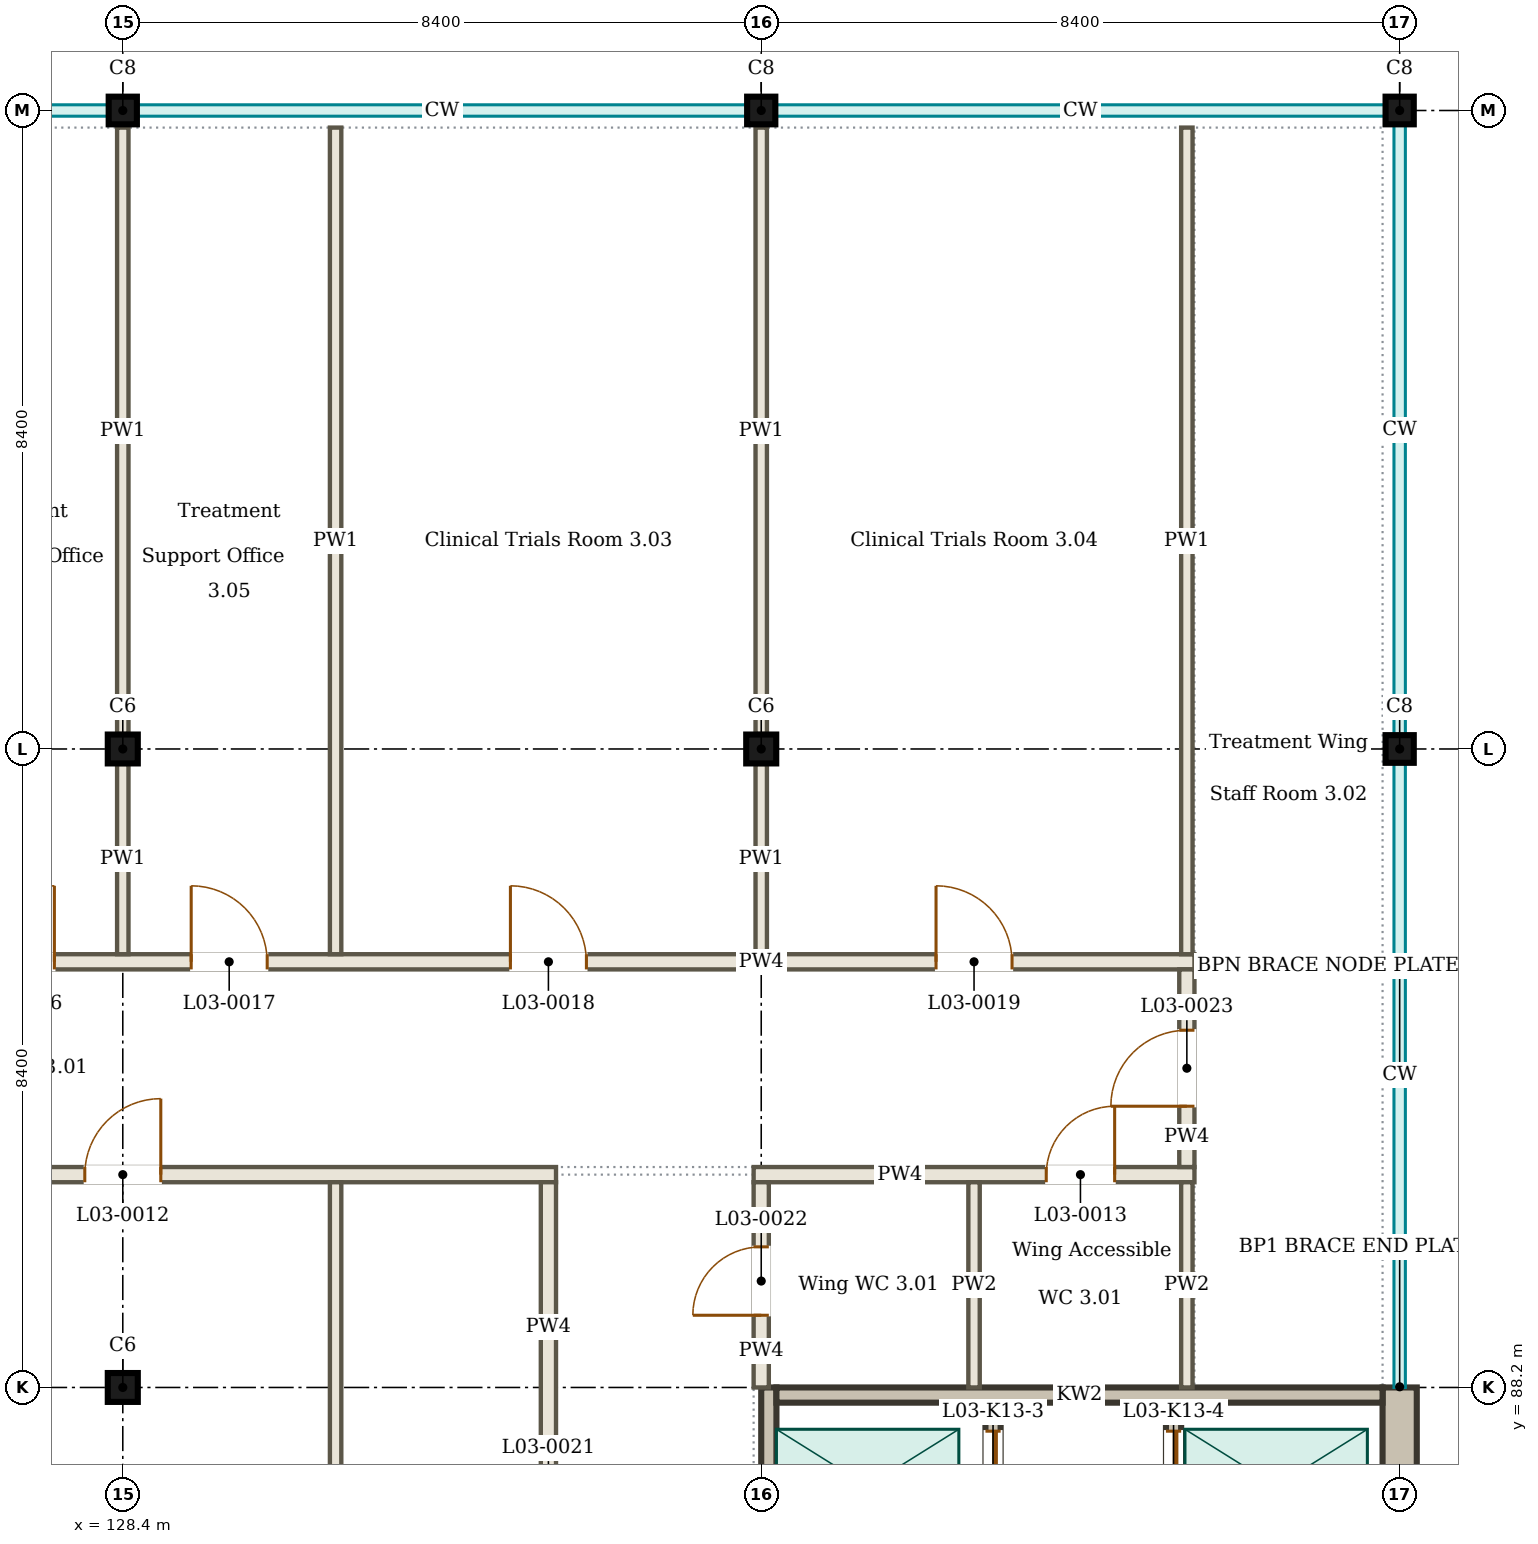
"""IFC4 building model, lengths in metres.
Left out: names, types, materials, properties, quantities, classifications, styles, units other than length and angle.
Written with IfcOpenShell. Run it as: python <this file> out.ifc"""

import sys

from ifc_helpers import new_model, si_unit, direction, frame, frame_2d, origin, origin_2d, place, context, subcontext, project, spatial, rectangle, i_section, extrude, element, fill, save


model = new_model("IFC4")
c1 = context("Model", 3, precision=1e-05, world=origin(), true_north=direction((0.0, 1.0)))
c2 = subcontext(c1, "Body", "Model", "MODEL_VIEW")
j1 = project(units=[si_unit("LENGTHUNIT", "METRE"), si_unit("PLANEANGLEUNIT", "RADIAN")], contexts=[c1])
p1 = place(None, origin())
s1 = spatial("IfcSite", under=j1, at=p1, CompositionType="ELEMENT")
p2 = place(p1, origin())
s2 = spatial("IfcBuilding", under=s1, at=p2, CompositionType="ELEMENT")
p3 = place(p2, frame((0.0, 0.0, 13.5)))
s3 = spatial("IfcBuildingStorey", under=s2, at=p3, CompositionType="ELEMENT", Elevation=13.5)
for number, where, z_axis, x_axis in (
    (1, (128.4, 88.2, 0.0), (0.0, 0.0, 1.0), (1.0, 0.0, 0.0)),
    (2, (128.4, 96.6, 0.0), (0.0, 0.0, 1.0), (1.0, 0.0, 0.0)),
    (3, (136.8, 96.6, 0.0), (0.0, 0.0, 1.0), (1.0, 0.0, 0.0)),
):
    element("IfcColumn", number, at=place(p3, frame(where, z_axis=z_axis, x_axis=x_axis)), inside=s3, PredefinedType="COLUMN", context=c2, shape_type="SweptSolid", body=[
        extrude(i_section(OverallWidth=0.395, OverallDepth=0.38, WebThickness=0.019, FlangeThickness=0.03, FilletRadius=0.027, at=origin_2d()), origin(), (0.0, 0.0, 1.0), 4.5),
    ])
for number, where, z_axis, x_axis in (
    (4, (145.2, 96.6, 0.0), (0.0, 0.0, 1.0), (1.0, 0.0, 0.0)),
    (5, (128.4, 105.0, 0.0), (0.0, 0.0, 1.0), (1.0, 0.0, 0.0)),
    (6, (136.8, 105.0, 0.0), (0.0, 0.0, 1.0), (1.0, 0.0, 0.0)),
    (7, (145.2, 105.0, 0.0), (0.0, 0.0, 1.0), (1.0, 0.0, 0.0)),
):
    element("IfcColumn", number, at=place(p3, frame(where, z_axis=z_axis, x_axis=x_axis)), inside=s3, PredefinedType="COLUMN", context=c2, shape_type="SweptSolid", body=[
        extrude(i_section(OverallWidth=0.371, OverallDepth=0.364, WebThickness=0.013, FlangeThickness=0.022, FilletRadius=0.027, at=origin_2d()), origin(), (0.0, 0.0, 1.0), 4.5),
    ])
p4 = place(p3, frame((136.8, 105.16, 3.87), z_axis=(0.0, 0.0, 1.0), x_axis=(1.0, 0.0, 0.0)))
e8 = element("IfcWall", 8, at=p4, inside=s3, PredefinedType="SOLIDWALL", context=c2, shape_type="SweptSolid", body=[
    extrude(rectangle(XDim=8.4, YDim=0.13, at=frame_2d((4.2, 0.0))), origin(), (0.0, 0.0, 1.0), 0.63),
])
p5 = place(p3, frame((111.825, 91.0, 0.0), z_axis=(0.0, 0.0, 1.0), x_axis=(1.0, 0.0, 0.0)))
e9 = element("IfcWall", 9, at=p5, inside=s3, PredefinedType="PARTITIONING", context=c2, shape_type="SweptSolid", body=[
    extrude(rectangle(XDim=22.275, YDim=0.2, at=frame_2d((11.138, 0.0))), origin(), (0.0, 0.0, 1.0), 3.8),
])
p6 = place(p5, frame((3.475, 0.0, 0.0)))
e10 = element("IfcOpeningElement", 10, at=p6, cuts=e9, PredefinedType="OPENING", context=c2, shape_type="SweptSolid", body=[
    extrude(rectangle(XDim=1.0, YDim=2.1, at=frame_2d((0.5, 1.05))), frame((0.0, 0.11, 0.0), z_axis=(0.0, -1.0, 0.0), x_axis=(1.0, 0.0, 0.0)), (0.0, 0.0, 1.0), 0.22),
])
p7 = place(p5, frame((10.475, 0.0, 0.0)))
e11 = element("IfcOpeningElement", 11, at=p7, cuts=e9, PredefinedType="OPENING", context=c2, shape_type="SweptSolid", body=[
    extrude(rectangle(XDim=1.0, YDim=2.1, at=frame_2d((0.5, 1.05))), frame((0.0, 0.11, 0.0), z_axis=(0.0, -1.0, 0.0), x_axis=(1.0, 0.0, 0.0)), (0.0, 0.0, 1.0), 0.22),
])
p8 = place(p5, frame((16.075, 0.0, 0.0)))
e12 = element("IfcOpeningElement", 12, at=p8, cuts=e9, PredefinedType="OPENING", context=c2, shape_type="SweptSolid", body=[
    extrude(rectangle(XDim=1.0, YDim=2.1, at=frame_2d((0.5, 1.05))), frame((0.0, 0.11, 0.0), z_axis=(0.0, -1.0, 0.0), x_axis=(1.0, 0.0, 0.0)), (0.0, 0.0, 1.0), 0.22),
])
p9 = place(p3, frame((136.7, 91.0, 0.0), z_axis=(0.0, 0.0, 1.0), x_axis=(1.0, 0.0, 0.0)))
e13 = element("IfcWall", 13, at=p9, inside=s3, PredefinedType="PARTITIONING", context=c2, shape_type="SweptSolid", body=[
    extrude(rectangle(XDim=5.8, YDim=0.2, at=frame_2d((2.9, 0.0))), origin(), (0.0, 0.0, 1.0), 3.8),
])
p10 = place(p9, frame((3.85, 0.0, 0.0)))
e14 = element("IfcOpeningElement", 14, at=p10, cuts=e13, PredefinedType="OPENING", context=c2, shape_type="SweptSolid", body=[
    extrude(rectangle(XDim=0.9, YDim=2.1, at=frame_2d((0.45, 1.05))), frame((0.0, 0.11, 0.0), z_axis=(0.0, -1.0, 0.0), x_axis=(1.0, 0.0, 0.0)), (0.0, 0.0, 1.0), 0.22),
])
p11 = place(p3, frame((119.9, 93.8, 0.0), z_axis=(0.0, 0.0, 1.0), x_axis=(1.0, 0.0, 0.0)))
e15 = element("IfcWall", 15, at=p11, inside=s3, PredefinedType="PARTITIONING", context=c2, shape_type="SweptSolid", body=[
    extrude(rectangle(XDim=22.6, YDim=0.2, at=frame_2d((11.3, 0.0))), origin(), (0.0, 0.0, 1.0), 3.8),
])
p12 = place(p11, frame((1.0, 0.0, 0.0)))
e16 = element("IfcOpeningElement", 16, at=p12, cuts=e15, PredefinedType="OPENING", context=c2, shape_type="SweptSolid", body=[
    extrude(rectangle(XDim=1.0, YDim=2.1, at=frame_2d((0.5, 1.05))), frame((0.0, 0.11, 0.0), z_axis=(0.0, -1.0, 0.0), x_axis=(1.0, 0.0, 0.0)), (0.0, 0.0, 1.0), 0.22),
])
p13 = place(p11, frame((3.8, 0.0, 0.0)))
e17 = element("IfcOpeningElement", 17, at=p13, cuts=e15, PredefinedType="OPENING", context=c2, shape_type="SweptSolid", body=[
    extrude(rectangle(XDim=1.0, YDim=2.1, at=frame_2d((0.5, 1.05))), frame((0.0, 0.11, 0.0), z_axis=(0.0, -1.0, 0.0), x_axis=(1.0, 0.0, 0.0)), (0.0, 0.0, 1.0), 0.22),
])
p14 = place(p11, frame((6.6, 0.0, 0.0)))
e18 = element("IfcOpeningElement", 18, at=p14, cuts=e15, PredefinedType="OPENING", context=c2, shape_type="SweptSolid", body=[
    extrude(rectangle(XDim=1.0, YDim=2.1, at=frame_2d((0.5, 1.05))), frame((0.0, 0.11, 0.0), z_axis=(0.0, -1.0, 0.0), x_axis=(1.0, 0.0, 0.0)), (0.0, 0.0, 1.0), 0.22),
])
p15 = place(p11, frame((9.4, 0.0, 0.0)))
e19 = element("IfcOpeningElement", 19, at=p15, cuts=e15, PredefinedType="OPENING", context=c2, shape_type="SweptSolid", body=[
    extrude(rectangle(XDim=1.0, YDim=2.1, at=frame_2d((0.5, 1.05))), frame((0.0, 0.11, 0.0), z_axis=(0.0, -1.0, 0.0), x_axis=(1.0, 0.0, 0.0)), (0.0, 0.0, 1.0), 0.22),
])
p16 = place(p11, frame((13.6, 0.0, 0.0)))
e20 = element("IfcOpeningElement", 20, at=p16, cuts=e15, PredefinedType="OPENING", context=c2, shape_type="SweptSolid", body=[
    extrude(rectangle(XDim=1.0, YDim=2.1, at=frame_2d((0.5, 1.05))), frame((0.0, 0.11, 0.0), z_axis=(0.0, -1.0, 0.0), x_axis=(1.0, 0.0, 0.0)), (0.0, 0.0, 1.0), 0.22),
])
p17 = place(p11, frame((19.2, 0.0, 0.0)))
e21 = element("IfcOpeningElement", 21, at=p17, cuts=e15, PredefinedType="OPENING", context=c2, shape_type="SweptSolid", body=[
    extrude(rectangle(XDim=1.0, YDim=2.1, at=frame_2d((0.5, 1.05))), frame((0.0, 0.11, 0.0), z_axis=(0.0, -1.0, 0.0), x_axis=(1.0, 0.0, 0.0)), (0.0, 0.0, 1.0), 0.22),
])
p18 = place(p3, frame((128.4, 93.9, 0.0), z_axis=(0.0, 0.0, 1.0), x_axis=(0.0, 1.0, 0.0)))
e22 = element("IfcWall", 22, at=p18, inside=s3, PredefinedType="PARTITIONING", context=c2, shape_type="SweptSolid", body=[
    extrude(rectangle(XDim=2.503, YDim=0.15, at=frame_2d((1.251, 0.0))), origin(), (0.0, 0.0, 1.0), 3.8),
])
p19 = place(p3, frame((128.4, 96.798, 0.0), z_axis=(0.0, 0.0, 1.0), x_axis=(0.0, 1.0, 0.0)))
e23 = element("IfcWall", 23, at=p19, inside=s3, PredefinedType="PARTITIONING", context=c2, shape_type="SweptSolid", body=[
    extrude(rectangle(XDim=7.977, YDim=0.15, at=frame_2d((3.989, 0.0))), origin(), (0.0, 0.0, 1.0), 3.8),
])
for number, where, z_axis, x_axis in (
    (24, (131.2, 80.025, 0.0), (0.0, 0.0, 1.0), (0.0, 1.0, 0.0)),
    (25, (131.2, 93.9, 0.0), (0.0, 0.0, 1.0), (0.0, 1.0, 0.0)),
):
    element("IfcWall", number, at=place(p3, frame(where, z_axis=z_axis, x_axis=x_axis)), inside=s3, PredefinedType="PARTITIONING", context=c2, shape_type="SweptSolid", body=[
        extrude(rectangle(XDim=10.875, YDim=0.15, at=frame_2d((5.438, 0.0))), origin(), (0.0, 0.0, 1.0), 3.8),
    ])
p20 = place(p3, frame((134.0, 82.3, 0.0), z_axis=(0.0, 0.0, 1.0), x_axis=(0.0, 1.0, 0.0)))
e26 = element("IfcWall", 26, at=p20, inside=s3, PredefinedType="PARTITIONING", context=c2, shape_type="SweptSolid", body=[
    extrude(rectangle(XDim=8.6, YDim=0.2, at=frame_2d((4.3, 0.0))), origin(), (0.0, 0.0, 1.0), 3.8),
])
p21 = place(p20, frame((3.8, 0.0, 0.0)))
e27 = element("IfcOpeningElement", 27, at=p21, cuts=e26, PredefinedType="OPENING", context=c2, shape_type="SweptSolid", body=[
    extrude(rectangle(XDim=1.0, YDim=2.1, at=frame_2d((0.5, 1.05))), frame((0.0, 0.11, 0.0), z_axis=(0.0, -1.0, 0.0), x_axis=(1.0, 0.0, 0.0)), (0.0, 0.0, 1.0), 0.22),
])
p22 = place(p3, frame((136.8, 88.2, 0.0), z_axis=(0.0, 0.0, 1.0), x_axis=(0.0, 1.0, 0.0)))
e28 = element("IfcWall", 28, at=p22, inside=s3, PredefinedType="PARTITIONING", context=c2, shape_type="SweptSolid", body=[
    extrude(rectangle(XDim=2.7, YDim=0.2, at=frame_2d((1.35, 0.0))), origin(), (0.0, 0.0, 1.0), 3.8),
])
p23 = place(p22, frame((0.95, 0.0, 0.0)))
e29 = element("IfcOpeningElement", 29, at=p23, cuts=e28, PredefinedType="OPENING", context=c2, shape_type="SweptSolid", body=[
    extrude(rectangle(XDim=0.9, YDim=2.1, at=frame_2d((0.45, 1.05))), frame((0.0, 0.11, 0.0), z_axis=(0.0, -1.0, 0.0), x_axis=(1.0, 0.0, 0.0)), (0.0, 0.0, 1.0), 0.22),
])
p24 = place(p3, frame((136.8, 93.9, 0.0), z_axis=(0.0, 0.0, 1.0), x_axis=(0.0, 1.0, 0.0)))
e30 = element("IfcWall", 30, at=p24, inside=s3, PredefinedType="PARTITIONING", context=c2, shape_type="SweptSolid", body=[
    extrude(rectangle(XDim=2.503, YDim=0.15, at=frame_2d((1.251, 0.0))), origin(), (0.0, 0.0, 1.0), 3.8),
])
p25 = place(p3, frame((136.8, 96.798, 0.0), z_axis=(0.0, 0.0, 1.0), x_axis=(0.0, 1.0, 0.0)))
e31 = element("IfcWall", 31, at=p25, inside=s3, PredefinedType="PARTITIONING", context=c2, shape_type="SweptSolid", body=[
    extrude(rectangle(XDim=7.977, YDim=0.15, at=frame_2d((3.989, 0.0))), origin(), (0.0, 0.0, 1.0), 3.8),
])
for number, where, z_axis, x_axis in (
    (32, (139.6, 88.2, 0.0), (0.0, 0.0, 1.0), (0.0, 1.0, 0.0)),
    (33, (142.4, 88.2, 0.0), (0.0, 0.0, 1.0), (0.0, 1.0, 0.0)),
):
    element("IfcWall", number, at=place(p3, frame(where, z_axis=z_axis, x_axis=x_axis)), inside=s3, PredefinedType="PARTITIONING", context=c2, shape_type="SweptSolid", body=[
        extrude(rectangle(XDim=2.7, YDim=0.15, at=frame_2d((1.35, 0.0))), origin(), (0.0, 0.0, 1.0), 3.95),
    ])
p26 = place(p3, frame((142.4, 91.1, 0.0), z_axis=(0.0, 0.0, 1.0), x_axis=(0.0, 1.0, 0.0)))
e34 = element("IfcWall", 34, at=p26, inside=s3, PredefinedType="PARTITIONING", context=c2, shape_type="SweptSolid", body=[
    extrude(rectangle(XDim=2.6, YDim=0.2, at=frame_2d((1.3, 0.0))), origin(), (0.0, 0.0, 1.0), 3.95),
])
p27 = place(p26, frame((0.8, 0.0, 0.0)))
e35 = element("IfcOpeningElement", 35, at=p27, cuts=e34, PredefinedType="OPENING", context=c2, shape_type="SweptSolid", body=[
    extrude(rectangle(XDim=1.0, YDim=2.1, at=frame_2d((0.5, 1.05))), frame((0.0, 0.11, 0.0), z_axis=(0.0, -1.0, 0.0), x_axis=(1.0, 0.0, 0.0)), (0.0, 0.0, 1.0), 0.22),
])
p28 = place(p3, frame((142.4, 93.9, 0.0), z_axis=(0.0, 0.0, 1.0), x_axis=(0.0, 1.0, 0.0)))
e36 = element("IfcWall", 36, at=p28, inside=s3, PredefinedType="PARTITIONING", context=c2, shape_type="SweptSolid", body=[
    extrude(rectangle(XDim=10.875, YDim=0.15, at=frame_2d((5.438, 0.0))), origin(), (0.0, 0.0, 1.0), 3.8),
])
p29 = place(p3, frame((136.9, 79.8, 0.0), z_axis=(0.0, 0.0, 1.0), x_axis=(0.0, 1.0, 0.0)))
e37 = element("IfcWall", 37, at=p29, inside=s3, PredefinedType="SOLIDWALL", context=c2, shape_type="SweptSolid", body=[
    extrude(rectangle(XDim=8.4, YDim=0.2, at=frame_2d((4.2, 0.0))), origin(), (0.0, 0.0, 1.0), 4.5),
])
p30 = place(p29, frame((4.725, 0.0, 0.0)))
e38 = element("IfcOpeningElement", 38, at=p30, cuts=e37, PredefinedType="OPENING", context=c2, shape_type="SweptSolid", body=[
    extrude(rectangle(XDim=1.3, YDim=2.1, at=frame_2d((0.65, 1.05))), frame((0.0, 0.11, 0.0), z_axis=(0.0, -1.0, 0.0), x_axis=(1.0, 0.0, 0.0)), (0.0, 0.0, 1.0), 0.22),
])
p31 = place(p3, frame((145.2, 79.8, 0.0), z_axis=(0.0, 0.0, 1.0), x_axis=(0.0, 1.0, 0.0)))
e39 = element("IfcWall", 39, at=p31, inside=s3, PredefinedType="SOLIDWALL", context=c2, shape_type="SweptSolid", body=[
    extrude(rectangle(XDim=8.4, YDim=0.45, at=frame_2d((4.2, 0.0))), origin(), (0.0, 0.0, 1.0), 4.5),
])
p32 = place(p3, frame((137.0, 88.1, 0.0), z_axis=(0.0, 0.0, 1.0), x_axis=(1.0, 0.0, 0.0)))
e40 = element("IfcWall", 40, at=p32, inside=s3, PredefinedType="SOLIDWALL", context=c2, shape_type="SweptSolid", body=[
    extrude(rectangle(XDim=7.975, YDim=0.2, at=frame_2d((3.988, 0.0))), origin(), (0.0, 0.0, 1.0), 4.5),
])
p33 = place(p3, frame((139.85, 86.15, 0.0), z_axis=(0.0, 0.0, 1.0), x_axis=(0.0, 1.0, 0.0)))
e41 = element("IfcWall", 41, at=p33, inside=s3, PredefinedType="SOLIDWALL", context=c2, shape_type="SweptSolid", body=[
    extrude(rectangle(XDim=1.85, YDim=0.2, at=frame_2d((0.925, 0.0))), origin(), (0.0, 0.0, 1.0), 4.5),
])
p34 = place(p33, frame((0.375, 0.0, 0.0)))
e42 = element("IfcOpeningElement", 42, at=p34, cuts=e41, PredefinedType="OPENING", context=c2, shape_type="SweptSolid", body=[
    extrude(rectangle(XDim=1.1, YDim=2.1, at=frame_2d((0.55, 1.05))), frame((0.0, 0.11, 0.0), z_axis=(0.0, -1.0, 0.0), x_axis=(1.0, 0.0, 0.0)), (0.0, 0.0, 1.0), 0.22),
])
p35 = place(p3, frame((142.225, 86.15, 0.0), z_axis=(0.0, 0.0, 1.0), x_axis=(0.0, 1.0, 0.0)))
e43 = element("IfcWall", 43, at=p35, inside=s3, PredefinedType="SOLIDWALL", context=c2, shape_type="SweptSolid", body=[
    extrude(rectangle(XDim=1.85, YDim=0.2, at=frame_2d((0.925, 0.0))), origin(), (0.0, 0.0, 1.0), 4.5),
])
p36 = place(p35, frame((0.375, 0.0, 0.0)))
e44 = element("IfcOpeningElement", 44, at=p36, cuts=e43, PredefinedType="OPENING", context=c2, shape_type="SweptSolid", body=[
    extrude(rectangle(XDim=1.1, YDim=2.1, at=frame_2d((0.55, 1.05))), frame((0.0, 0.11, 0.0), z_axis=(0.0, -1.0, 0.0), x_axis=(1.0, 0.0, 0.0)), (0.0, 0.0, 1.0), 0.22),
])
p37 = place(p8, origin())
e45 = element("IfcDoor", 45, at=p37, inside=s3, OperationType="SINGLE_SWING_RIGHT", PredefinedType="DOOR", context=c2, shape_type="SweptSolid", body=[
    extrude(rectangle(XDim=1.0, YDim=2.1, at=frame_2d((0.5, 1.05))), frame((0.0, 0.025, 0.0), z_axis=(0.0, -1.0, 0.0), x_axis=(1.0, 0.0, 0.0)), (0.0, 0.0, 1.0), 0.05),
])
fill(e12, e45)
p38 = place(p10, origin())
e46 = element("IfcDoor", 46, at=p38, inside=s3, OperationType="SINGLE_SWING_RIGHT", PredefinedType="DOOR", context=c2, shape_type="SweptSolid", body=[
    extrude(rectangle(XDim=0.9, YDim=2.1, at=frame_2d((0.45, 1.05))), frame((0.0, 0.025, 0.0), z_axis=(0.0, -1.0, 0.0), x_axis=(1.0, 0.0, 0.0)), (0.0, 0.0, 1.0), 0.05),
])
fill(e14, e46)
p39 = place(p14, origin())
e47 = element("IfcDoor", 47, at=p39, inside=s3, OperationType="SINGLE_SWING_RIGHT", PredefinedType="DOOR", context=c2, shape_type="SweptSolid", body=[
    extrude(rectangle(XDim=1.0, YDim=2.1, at=frame_2d((0.5, 1.05))), frame((0.0, 0.025, 0.0), z_axis=(0.0, -1.0, 0.0), x_axis=(1.0, 0.0, 0.0)), (0.0, 0.0, 1.0), 0.05),
])
fill(e18, e47)
p40 = place(p15, origin())
e48 = element("IfcDoor", 48, at=p40, inside=s3, OperationType="SINGLE_SWING_LEFT", PredefinedType="DOOR", context=c2, shape_type="SweptSolid", body=[
    extrude(rectangle(XDim=1.0, YDim=2.1, at=frame_2d((0.5, 1.05))), frame((0.0, 0.025, 0.0), z_axis=(0.0, -1.0, 0.0), x_axis=(1.0, 0.0, 0.0)), (0.0, 0.0, 1.0), 0.05),
])
fill(e19, e48)
p41 = place(p16, origin())
e49 = element("IfcDoor", 49, at=p41, inside=s3, OperationType="SINGLE_SWING_LEFT", PredefinedType="DOOR", context=c2, shape_type="SweptSolid", body=[
    extrude(rectangle(XDim=1.0, YDim=2.1, at=frame_2d((0.5, 1.05))), frame((0.0, 0.025, 0.0), z_axis=(0.0, -1.0, 0.0), x_axis=(1.0, 0.0, 0.0)), (0.0, 0.0, 1.0), 0.05),
])
fill(e20, e49)
p42 = place(p17, origin())
e50 = element("IfcDoor", 50, at=p42, inside=s3, OperationType="SINGLE_SWING_LEFT", PredefinedType="DOOR", context=c2, shape_type="SweptSolid", body=[
    extrude(rectangle(XDim=1.0, YDim=2.1, at=frame_2d((0.5, 1.05))), frame((0.0, 0.025, 0.0), z_axis=(0.0, -1.0, 0.0), x_axis=(1.0, 0.0, 0.0)), (0.0, 0.0, 1.0), 0.05),
])
fill(e21, e50)
p43 = place(p23, origin())
e51 = element("IfcDoor", 51, at=p43, inside=s3, OperationType="SINGLE_SWING_LEFT", PredefinedType="DOOR", context=c2, shape_type="SweptSolid", body=[
    extrude(rectangle(XDim=0.9, YDim=2.1, at=frame_2d((0.45, 1.05))), frame((0.0, 0.025, 0.0), z_axis=(0.0, -1.0, 0.0), x_axis=(1.0, 0.0, 0.0)), (0.0, 0.0, 1.0), 0.05),
])
fill(e29, e51)
p44 = place(p27, origin())
e52 = element("IfcDoor", 52, at=p44, inside=s3, OperationType="SINGLE_SWING_LEFT", PredefinedType="DOOR", context=c2, shape_type="SweptSolid", body=[
    extrude(rectangle(XDim=1.0, YDim=2.1, at=frame_2d((0.5, 1.05))), frame((0.0, 0.025, 0.0), z_axis=(0.0, -1.0, 0.0), x_axis=(1.0, 0.0, 0.0)), (0.0, 0.0, 1.0), 0.05),
])
fill(e35, e52)
p45 = place(p34, origin())
e53 = element("IfcDoor", 53, at=p45, inside=s3, OperationType="DOUBLE_DOOR_SLIDING", PredefinedType="DOOR", context=c2, shape_type="SweptSolid", body=[
    extrude(rectangle(XDim=1.1, YDim=2.1, at=frame_2d((0.55, 1.05))), frame((0.0, 0.025, 0.0), z_axis=(0.0, -1.0, 0.0), x_axis=(1.0, 0.0, 0.0)), (0.0, 0.0, 1.0), 0.05),
])
fill(e42, e53)
p46 = place(p36, origin())
e54 = element("IfcDoor", 54, at=p46, inside=s3, OperationType="DOUBLE_DOOR_SLIDING", PredefinedType="DOOR", context=c2, shape_type="SweptSolid", body=[
    extrude(rectangle(XDim=1.1, YDim=2.1, at=frame_2d((0.55, 1.05))), frame((0.0, 0.025, 0.0), z_axis=(0.0, -1.0, 0.0), x_axis=(1.0, 0.0, 0.0)), (0.0, 0.0, 1.0), 0.05),
])
fill(e44, e54)
save(model, sys.argv[1])
